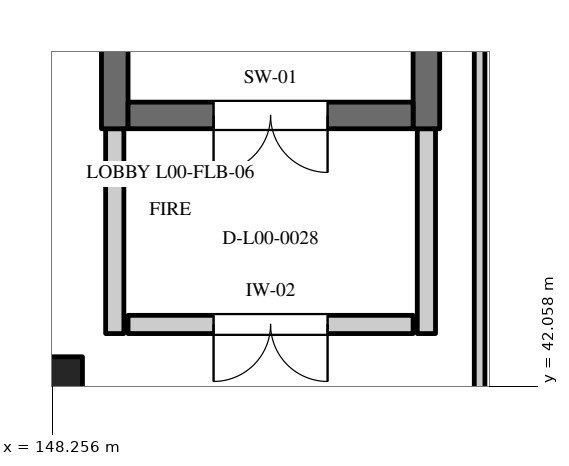
"""IFC4 building model, lengths in metres.
Left out: names, types, materials, properties, quantities, classifications, styles, units other than length and angle.
Written with IfcOpenShell. Run it as: python <this file> out.ifc"""

import sys

from ifc_helpers import new_model, si_unit, direction, frame, frame_2d, origin, origin_2d, place, context, subcontext, project, spatial, rectangle, extrude, element, fill, save


model = new_model("IFC4")
c1 = context("Model", 3, precision=1e-05, world=origin(), true_north=direction((0.0, 1.0)))
c2 = subcontext(c1, "Body", "Model", "MODEL_VIEW")
j1 = project(units=[si_unit("LENGTHUNIT", "METRE"), si_unit("PLANEANGLEUNIT", "RADIAN")], contexts=[c1])
p1 = place(None, origin())
s1 = spatial("IfcSite", under=j1, at=p1, CompositionType="ELEMENT")
p2 = place(p1, origin())
s2 = spatial("IfcBuilding", under=s1, at=p2, CompositionType="ELEMENT")
p3 = place(p2, origin())
s3 = spatial("IfcBuildingStorey", under=s2, at=p3, CompositionType="ELEMENT", Elevation=0.0)
p4 = place(p3, frame((148.2, 42.0, 0.0), z_axis=(0.0, 0.0, 1.0), x_axis=(1.0, 0.0, 0.0)))
e1 = element("IfcColumn", 1, at=p4, inside=s3, PredefinedType="COLUMN", context=c2, shape_type="SweptSolid", body=[
    extrude(rectangle(XDim=0.9, YDim=0.9, at=origin_2d()), origin(), (0.0, 0.0, 1.0), 4.8),
])
for number, where, z_axis, x_axis in (
    (2, (149.075, 45.45, 0.0), (0.0, 0.0, 1.0), (0.0, 1.0, 0.0)),
    (3, (153.175, 45.45, 0.0), (0.0, 0.0, 1.0), (0.0, 1.0, 0.0)),
):
    element("IfcWall", number, at=place(p3, frame(where, z_axis=z_axis, x_axis=x_axis)), inside=s3, PredefinedType="SHEAR", context=c2, shape_type="SweptSolid", body=[
        extrude(rectangle(XDim=10.5, YDim=0.35, at=frame_2d((5.25, 0.0))), origin(), (0.0, 0.0, 1.0), 4.8),
    ])
p5 = place(p3, frame((149.25, 45.625, 0.0), z_axis=(0.0, 0.0, 1.0), x_axis=(1.0, 0.0, 0.0)))
e4 = element("IfcWall", 4, at=p5, inside=s3, PredefinedType="SHEAR", context=c2, shape_type="SweptSolid", body=[
    extrude(rectangle(XDim=3.75, YDim=0.35, at=frame_2d((1.875, 0.0))), origin(), (0.0, 0.0, 1.0), 4.45),
])
p6 = place(p5, frame((1.125, 0.0, 0.0)))
e5 = element("IfcOpeningElement", 5, at=p6, cuts=e4, PredefinedType="OPENING", context=c2, shape_type="SweptSolid", body=[
    extrude(rectangle(XDim=1.5, YDim=2.2, at=frame_2d((0.75, 1.1))), frame((0.0, 0.187, 0.0), z_axis=(0.0, -1.0, 0.0), x_axis=(1.0, 0.0, 0.0)), (0.0, 0.0, 1.0), 0.374),
])
for number, where, z_axis, x_axis in (
    (6, (149.075, 42.755, 0.0), (0.0, 0.0, 1.0), (0.0, 1.0, 0.0)),
    (7, (153.175, 42.755, 0.0), (0.0, 0.0, 1.0), (0.0, 1.0, 0.0)),
):
    element("IfcWall", number, at=place(p3, frame(where, z_axis=z_axis, x_axis=x_axis)), inside=s3, PredefinedType="STANDARD", context=c2, shape_type="SweptSolid", body=[
        extrude(rectangle(XDim=2.695, YDim=0.24, at=frame_2d((1.348, 0.0))), origin(), (0.0, 0.0, 1.0), 4.45),
    ])
p7 = place(p3, frame((149.25, 42.875, 0.0), z_axis=(0.0, 0.0, 1.0), x_axis=(1.0, 0.0, 0.0)))
e8 = element("IfcWall", 8, at=p7, inside=s3, PredefinedType="STANDARD", context=c2, shape_type="SweptSolid", body=[
    extrude(rectangle(XDim=3.75, YDim=0.24, at=frame_2d((1.875, 0.0))), origin(), (0.0, 0.0, 1.0), 4.45),
])
p8 = place(p7, frame((1.125, 0.0, 0.0)))
e9 = element("IfcOpeningElement", 9, at=p8, cuts=e8, PredefinedType="OPENING", context=c2, shape_type="SweptSolid", body=[
    extrude(rectangle(XDim=1.5, YDim=2.2, at=frame_2d((0.75, 1.1))), frame((0.0, 0.132, 0.0), z_axis=(0.0, -1.0, 0.0), x_axis=(1.0, 0.0, 0.0)), (0.0, 0.0, 1.0), 0.264),
])
p9 = place(p3, frame((153.875, 33.685, 0.0), z_axis=(0.0, 0.0, 1.0), x_axis=(0.0, 1.0, 0.0)))
e10 = element("IfcWall", 10, at=p9, inside=s3, PredefinedType="PARTITIONING", context=c2, shape_type="SweptSolid", body=[
    extrude(rectangle(XDim=13.03, YDim=0.14, at=frame_2d((6.515, 0.0))), origin(), (0.0, 0.0, 1.0), 4.43),
])
p10 = place(p6, frame((1.5, 0.0, 0.0), z_axis=(0.0, 0.0, 1.0), x_axis=(-1.0, 0.0, 0.0)))
e11 = element("IfcDoor", 11, at=p10, inside=s3, OperationType="DOUBLE_DOOR_SINGLE_SWING", PredefinedType="DOOR", context=c2, shape_type="SweptSolid", body=[
    extrude(rectangle(XDim=1.5, YDim=2.2, at=frame_2d((0.75, 1.1))), frame((0.0, 0.025, 0.0), z_axis=(0.0, -1.0, 0.0), x_axis=(1.0, 0.0, 0.0)), (0.0, 0.0, 1.0), 0.05),
])
fill(e5, e11)
p11 = place(p8, frame((1.5, 0.0, 0.0), z_axis=(0.0, 0.0, 1.0), x_axis=(-1.0, 0.0, 0.0)))
e12 = element("IfcDoor", 12, at=p11, inside=s3, OperationType="DOUBLE_DOOR_SINGLE_SWING", PredefinedType="DOOR", context=c2, shape_type="SweptSolid", body=[
    extrude(rectangle(XDim=1.5, YDim=2.2, at=frame_2d((0.75, 1.1))), frame((0.0, 0.025, 0.0), z_axis=(0.0, -1.0, 0.0), x_axis=(1.0, 0.0, 0.0)), (0.0, 0.0, 1.0), 0.05),
])
fill(e9, e12)
save(model, sys.argv[1])
